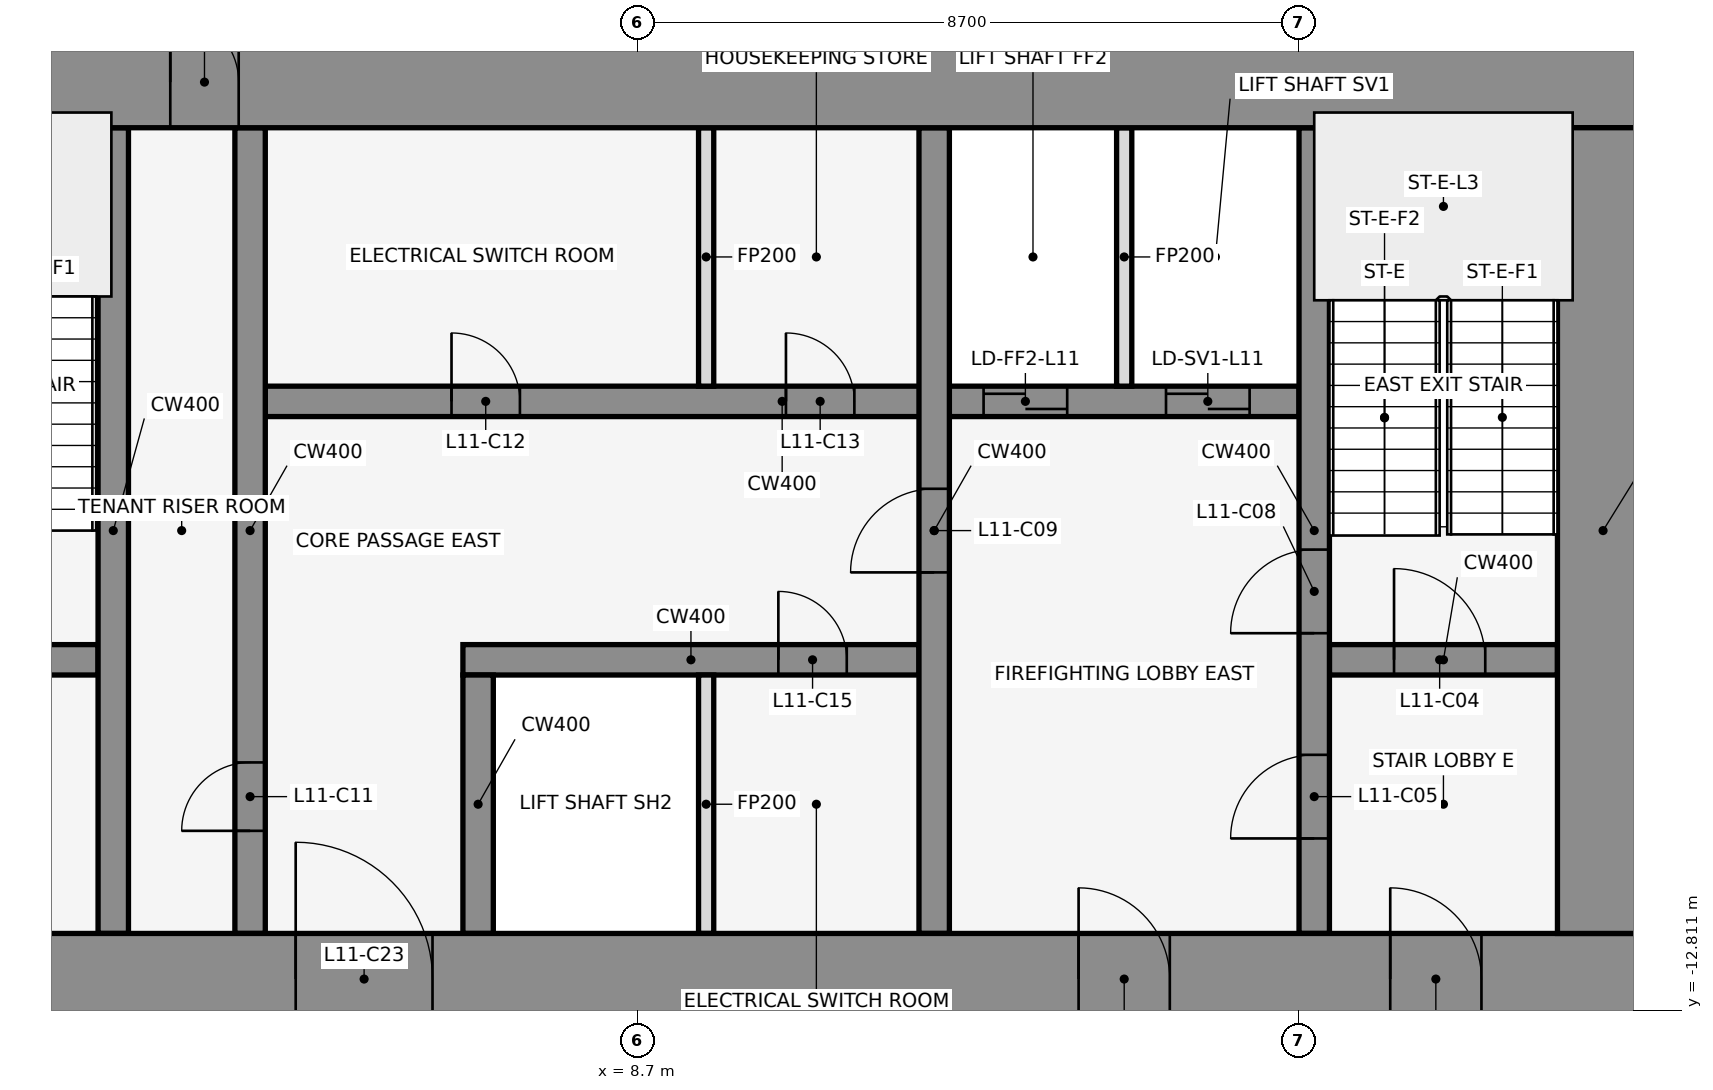
"""IFC4 building model, lengths in metres.
Left out: names, types, materials, properties, quantities, classifications, styles, units other than length and angle.
Written with IfcOpenShell. Run it as: python <this file> out.ifc"""

import sys

from ifc_helpers import new_model, si_unit, direction, frame, frame_2d, origin, place, context, subcontext, project, spatial, rectangle, extrude, element, fill, save


model = new_model("IFC4")
c1 = context("Model", 3, precision=1e-05, world=origin(), true_north=direction((0.0, 1.0)))
c2 = subcontext(c1, "Body", "Model", "MODEL_VIEW")
j1 = project(units=[si_unit("LENGTHUNIT", "METRE"), si_unit("PLANEANGLEUNIT", "RADIAN")], contexts=[c1])
p1 = place(None, origin())
s1 = spatial("IfcSite", under=j1, at=p1, CompositionType="ELEMENT")
p2 = place(p1, origin())
s2 = spatial("IfcBuilding", under=s1, at=p2, CompositionType="ELEMENT")
p3 = place(p2, frame((0.0, 0.0, 57.5)))
s3 = spatial("IfcBuildingStorey", under=s2, at=p3, CompositionType="ELEMENT", Elevation=57.5)
for number, where, z_axis, x_axis in (
    (1, (16.432, -0.105, 0.0), (0.0, 0.0, 1.0), (-0.84, 0.543, 0.0)),
    (2, (1.901, 1.08, 0.0), (0.0, 0.0, 1.0), (-0.84, -0.543, 0.0)),
):
    element("IfcWall", number, at=place(p3, frame(where, z_axis=z_axis, x_axis=x_axis)), inside=s3, PredefinedType="STANDARD", context=c2, shape_type="SweptSolid", body=[
        extrude(rectangle(XDim=2.183, YDim=0.25, at=frame_2d((1.091, 0.0))), origin(), (0.0, 0.0, 1.0), 4.35),
    ])
p4 = place(p3, frame((-1.6, -8.2, 0.0), z_axis=(0.0, 0.0, 1.0), x_axis=(1.0, 0.0, 0.0)))
e3 = element("IfcWall", 3, at=p4, inside=s3, PredefinedType="SHEAR", context=c2, shape_type="SweptSolid", body=[
    extrude(rectangle(XDim=3.2, YDim=0.4, at=frame_2d((1.6, 0.0))), origin(), (0.0, 0.0, 1.0), 4.5),
])
p5 = place(p4, frame((1.05, 0.0, 0.0)))
e4 = element("IfcOpeningElement", 4, at=p5, cuts=e3, PredefinedType="OPENING", context=c2, shape_type="SweptSolid", body=[
    extrude(rectangle(XDim=1.2, YDim=2.1, at=frame_2d((0.6, 1.05))), frame((0.0, 0.212, 0.0), z_axis=(0.0, -1.0, 0.0), x_axis=(1.0, 0.0, 0.0)), (0.0, 0.0, 1.0), 0.424),
])
p6 = place(p3, frame((6.4, -8.2, 0.0), z_axis=(0.0, 0.0, 1.0), x_axis=(1.0, 0.0, 0.0)))
e5 = element("IfcWall", 5, at=p6, inside=s3, PredefinedType="SHEAR", context=c2, shape_type="SweptSolid", body=[
    extrude(rectangle(XDim=6.0, YDim=0.4, at=frame_2d((3.0, 0.0))), origin(), (0.0, 0.0, 1.0), 4.5),
])
p7 = place(p6, frame((4.15, 0.0, 0.0)))
e6 = element("IfcOpeningElement", 6, at=p7, cuts=e5, PredefinedType="OPENING", context=c2, shape_type="SweptSolid", body=[
    extrude(rectangle(XDim=0.9, YDim=2.1, at=frame_2d((0.45, 1.05))), frame((0.0, 0.212, 0.0), z_axis=(0.0, -1.0, 0.0), x_axis=(1.0, 0.0, 0.0)), (0.0, 0.0, 1.0), 0.424),
])
p8 = place(p3, frame((17.8, -8.2, 0.0), z_axis=(0.0, 0.0, 1.0), x_axis=(1.0, 0.0, 0.0)))
e7 = element("IfcWall", 7, at=p8, inside=s3, PredefinedType="SHEAR", context=c2, shape_type="SweptSolid", body=[
    extrude(rectangle(XDim=3.0, YDim=0.4, at=frame_2d((1.5, 0.0))), origin(), (0.0, 0.0, 1.0), 4.5),
])
p9 = place(p8, frame((0.85, 0.0, 0.0)))
e8 = element("IfcOpeningElement", 8, at=p9, cuts=e7, PredefinedType="OPENING", context=c2, shape_type="SweptSolid", body=[
    extrude(rectangle(XDim=1.2, YDim=2.1, at=frame_2d((0.6, 1.05))), frame((0.0, 0.212, 0.0), z_axis=(0.0, -1.0, 0.0), x_axis=(1.0, 0.0, 0.0)), (0.0, 0.0, 1.0), 0.424),
])
p10 = place(p3, frame((3.8, -4.8, 0.0), z_axis=(0.0, 0.0, 1.0), x_axis=(1.0, 0.0, 0.0)))
e9 = element("IfcWall", 9, at=p10, inside=s3, PredefinedType="SHEAR", context=c2, shape_type="SweptSolid", body=[
    extrude(rectangle(XDim=13.6, YDim=0.4, at=frame_2d((6.8, 0.0))), origin(), (0.0, 0.0, 1.0), 4.5),
])
p11 = place(p10, frame((9.45, 0.0, 0.0)))
e10 = element("IfcOpeningElement", 10, at=p11, cuts=e9, PredefinedType="OPENING", context=c2, shape_type="SweptSolid", body=[
    extrude(rectangle(XDim=1.1, YDim=2.1, at=frame_2d((0.55, 1.05))), frame((0.0, 0.212, 0.0), z_axis=(0.0, -1.0, 0.0), x_axis=(1.0, 0.0, 0.0)), (0.0, 0.0, 1.0), 0.424),
])
p12 = place(p10, frame((11.85, 0.0, 0.0)))
e11 = element("IfcOpeningElement", 11, at=p12, cuts=e9, PredefinedType="OPENING", context=c2, shape_type="SweptSolid", body=[
    extrude(rectangle(XDim=1.1, YDim=2.1, at=frame_2d((0.55, 1.05))), frame((0.0, 0.212, 0.0), z_axis=(0.0, -1.0, 0.0), x_axis=(1.0, 0.0, 0.0)), (0.0, 0.0, 1.0), 0.424),
])
p13 = place(p10, frame((2.45, 0.0, 0.0)))
e12 = element("IfcOpeningElement", 12, at=p13, cuts=e9, PredefinedType="OPENING", context=c2, shape_type="SweptSolid", body=[
    extrude(rectangle(XDim=0.9, YDim=2.1, at=frame_2d((0.45, 1.05))), frame((0.0, 0.212, 0.0), z_axis=(0.0, -1.0, 0.0), x_axis=(1.0, 0.0, 0.0)), (0.0, 0.0, 1.0), 0.424),
])
p14 = place(p10, frame((6.85, 0.0, 0.0)))
e13 = element("IfcOpeningElement", 13, at=p14, cuts=e9, PredefinedType="OPENING", context=c2, shape_type="SweptSolid", body=[
    extrude(rectangle(XDim=0.9, YDim=2.1, at=frame_2d((0.45, 1.05))), frame((0.0, 0.212, 0.0), z_axis=(0.0, -1.0, 0.0), x_axis=(1.0, 0.0, 0.0)), (0.0, 0.0, 1.0), 0.424),
])
p15 = place(p3, frame((1.8, -11.8, 0.0), z_axis=(0.0, 0.0, 1.0), x_axis=(0.0, 1.0, 0.0)))
e14 = element("IfcWall", 14, at=p15, inside=s3, PredefinedType="SHEAR", context=c2, shape_type="SweptSolid", body=[
    extrude(rectangle(XDim=10.6, YDim=0.4, at=frame_2d((5.3, 0.0))), origin(), (0.0, 0.0, 1.0), 4.5),
])
p16 = place(p3, frame((3.6, -11.8, 0.0), z_axis=(0.0, 0.0, 1.0), x_axis=(0.0, 1.0, 0.0)))
e15 = element("IfcWall", 15, at=p16, inside=s3, PredefinedType="SHEAR", context=c2, shape_type="SweptSolid", body=[
    extrude(rectangle(XDim=10.6, YDim=0.4, at=frame_2d((5.3, 0.0))), origin(), (0.0, 0.0, 1.0), 4.5),
])
p17 = place(p16, frame((1.35, 0.0, 0.0)))
e16 = element("IfcOpeningElement", 16, at=p17, cuts=e15, PredefinedType="OPENING", context=c2, shape_type="SweptSolid", body=[
    extrude(rectangle(XDim=0.9, YDim=2.1, at=frame_2d((0.45, 1.05))), frame((0.0, 0.212, 0.0), z_axis=(0.0, -1.0, 0.0), x_axis=(1.0, 0.0, 0.0)), (0.0, 0.0, 1.0), 0.424),
])
p18 = place(p3, frame((6.6, -11.8, 0.0), z_axis=(0.0, 0.0, 1.0), x_axis=(0.0, 1.0, 0.0)))
e17 = element("IfcWall", 17, at=p18, inside=s3, PredefinedType="SHEAR", context=c2, shape_type="SweptSolid", body=[
    extrude(rectangle(XDim=3.4, YDim=0.4, at=frame_2d((1.7, 0.0))), origin(), (0.0, 0.0, 1.0), 4.5),
])
for number, where, z_axis, x_axis in (
    (18, (9.6, -11.8, 0.0), (0.0, 0.0, 1.0), (0.0, 1.0, 0.0)),
    (19, (9.6, -4.6, 0.0), (0.0, 0.0, 1.0), (0.0, 1.0, 0.0)),
):
    element("IfcWall", number, at=place(p3, frame(where, z_axis=z_axis, x_axis=x_axis)), inside=s3, PredefinedType="PARTITIONING", context=c2, shape_type="SweptSolid", body=[
        extrude(rectangle(XDim=3.4, YDim=0.2, at=frame_2d((1.7, 0.0))), origin(), (0.0, 0.0, 1.0), 3.418),
    ])
p19 = place(p3, frame((12.6, -11.8, 0.0), z_axis=(0.0, 0.0, 1.0), x_axis=(0.0, 1.0, 0.0)))
e20 = element("IfcWall", 20, at=p19, inside=s3, PredefinedType="SHEAR", context=c2, shape_type="SweptSolid", body=[
    extrude(rectangle(XDim=10.6, YDim=0.4, at=frame_2d((5.3, 0.0))), origin(), (0.0, 0.0, 1.0), 4.5),
])
p20 = place(p19, frame((4.75, 0.0, 0.0)))
e21 = element("IfcOpeningElement", 21, at=p20, cuts=e20, PredefinedType="OPENING", context=c2, shape_type="SweptSolid", body=[
    extrude(rectangle(XDim=1.1, YDim=2.1, at=frame_2d((0.55, 1.05))), frame((0.0, 0.212, 0.0), z_axis=(0.0, -1.0, 0.0), x_axis=(1.0, 0.0, 0.0)), (0.0, 0.0, 1.0), 0.424),
])
p21 = place(p3, frame((15.1, -4.6, 0.0), z_axis=(0.0, 0.0, 1.0), x_axis=(0.0, 1.0, 0.0)))
e22 = element("IfcWall", 22, at=p21, inside=s3, PredefinedType="PARTITIONING", context=c2, shape_type="SweptSolid", body=[
    extrude(rectangle(XDim=3.4, YDim=0.2, at=frame_2d((1.7, 0.0))), origin(), (0.0, 0.0, 1.0), 3.418),
])
p22 = place(p3, frame((17.6, -11.8, 0.0), z_axis=(0.0, 0.0, 1.0), x_axis=(0.0, 1.0, 0.0)))
e23 = element("IfcWall", 23, at=p22, inside=s3, PredefinedType="SHEAR", context=c2, shape_type="SweptSolid", body=[
    extrude(rectangle(XDim=10.6, YDim=0.4, at=frame_2d((5.3, 0.0))), origin(), (0.0, 0.0, 1.0), 4.5),
])
p23 = place(p22, frame((1.25, 0.0, 0.0)))
e24 = element("IfcOpeningElement", 24, at=p23, cuts=e23, PredefinedType="OPENING", context=c2, shape_type="SweptSolid", body=[
    extrude(rectangle(XDim=1.1, YDim=2.1, at=frame_2d((0.55, 1.05))), frame((0.0, 0.212, 0.0), z_axis=(0.0, -1.0, 0.0), x_axis=(1.0, 0.0, 0.0)), (0.0, 0.0, 1.0), 0.424),
])
p24 = place(p22, frame((3.95, 0.0, 0.0)))
e25 = element("IfcOpeningElement", 25, at=p24, cuts=e23, PredefinedType="OPENING", context=c2, shape_type="SweptSolid", body=[
    extrude(rectangle(XDim=1.1, YDim=2.1, at=frame_2d((0.55, 1.05))), frame((0.0, 0.212, 0.0), z_axis=(0.0, -1.0, 0.0), x_axis=(1.0, 0.0, 0.0)), (0.0, 0.0, 1.0), 0.424),
])
p25 = place(p3, frame((-22.0, -0.6, 0.0), z_axis=(0.0, 0.0, 1.0), x_axis=(1.0, 0.0, 0.0)))
e26 = element("IfcWall", 26, at=p25, inside=s3, PredefinedType="SHEAR", context=c2, shape_type="SweptSolid", body=[
    extrude(rectangle(XDim=44.0, YDim=1.2, at=frame_2d((22.0, 0.0))), origin(), (0.0, 0.0, 1.0), 4.5),
])
p26 = place(p25, frame((18.55, 0.0, 0.0)))
e27 = element("IfcOpeningElement", 27, at=p26, cuts=e26, PredefinedType="OPENING", context=c2, shape_type="SweptSolid", body=[
    extrude(rectangle(XDim=0.9, YDim=2.1, at=frame_2d((0.45, 1.05))), frame((0.0, 0.612, 0.0), z_axis=(0.0, -1.0, 0.0), x_axis=(1.0, 0.0, 0.0)), (0.0, 0.0, 1.0), 1.224),
])
p27 = place(p25, frame((24.55, 0.0, 0.0)))
e28 = element("IfcOpeningElement", 28, at=p27, cuts=e26, PredefinedType="OPENING", context=c2, shape_type="SweptSolid", body=[
    extrude(rectangle(XDim=0.9, YDim=2.1, at=frame_2d((0.45, 1.05))), frame((0.0, 0.612, 0.0), z_axis=(0.0, -1.0, 0.0), x_axis=(1.0, 0.0, 0.0)), (0.0, 0.0, 1.0), 1.224),
])
p28 = place(p3, frame((-22.0, -12.4, 0.0), z_axis=(0.0, 0.0, 1.0), x_axis=(1.0, 0.0, 0.0)))
e29 = element("IfcWall", 29, at=p28, inside=s3, PredefinedType="SHEAR", context=c2, shape_type="SweptSolid", body=[
    extrude(rectangle(XDim=44.0, YDim=1.2, at=frame_2d((22.0, 0.0))), origin(), (0.0, 0.0, 1.0), 4.5),
])
p29 = place(p28, frame((2.2, 0.0, 0.0)))
e30 = element("IfcOpeningElement", 30, at=p29, cuts=e29, PredefinedType="OPENING", context=c2, shape_type="SweptSolid", body=[
    extrude(rectangle(XDim=1.2, YDim=2.1, at=frame_2d((0.6, 1.05))), frame((0.0, 0.612, 0.0), z_axis=(0.0, -1.0, 0.0), x_axis=(1.0, 0.0, 0.0)), (0.0, 0.0, 1.0), 1.224),
])
p30 = place(p28, frame((21.4, 0.0, 0.0)))
e31 = element("IfcOpeningElement", 31, at=p30, cuts=e29, PredefinedType="OPENING", context=c2, shape_type="SweptSolid", body=[
    extrude(rectangle(XDim=1.2, YDim=2.1, at=frame_2d((0.6, 1.05))), frame((0.0, 0.612, 0.0), z_axis=(0.0, -1.0, 0.0), x_axis=(1.0, 0.0, 0.0)), (0.0, 0.0, 1.0), 1.224),
])
p31 = place(p28, frame((40.6, 0.0, 0.0)))
e32 = element("IfcOpeningElement", 32, at=p31, cuts=e29, PredefinedType="OPENING", context=c2, shape_type="SweptSolid", body=[
    extrude(rectangle(XDim=1.2, YDim=2.1, at=frame_2d((0.6, 1.05))), frame((0.0, 0.612, 0.0), z_axis=(0.0, -1.0, 0.0), x_axis=(1.0, 0.0, 0.0)), (0.0, 0.0, 1.0), 1.224),
])
p32 = place(p28, frame((16.0, 0.0, 0.0)))
e33 = element("IfcOpeningElement", 33, at=p32, cuts=e29, PredefinedType="OPENING", context=c2, shape_type="SweptSolid", body=[
    extrude(rectangle(XDim=1.8, YDim=2.1, at=frame_2d((0.9, 1.05))), frame((0.0, 0.612, 0.0), z_axis=(0.0, -1.0, 0.0), x_axis=(1.0, 0.0, 0.0)), (0.0, 0.0, 1.0), 1.224),
])
p33 = place(p28, frame((6.3, 0.0, 0.0)))
e34 = element("IfcOpeningElement", 34, at=p33, cuts=e29, PredefinedType="OPENING", context=c2, shape_type="SweptSolid", body=[
    extrude(rectangle(XDim=1.2, YDim=2.1, at=frame_2d((0.6, 1.05))), frame((0.0, 0.612, 0.0), z_axis=(0.0, -1.0, 0.0), x_axis=(1.0, 0.0, 0.0)), (0.0, 0.0, 1.0), 1.224),
])
p34 = place(p28, frame((26.2, 0.0, 0.0)))
e35 = element("IfcOpeningElement", 35, at=p34, cuts=e29, PredefinedType="OPENING", context=c2, shape_type="SweptSolid", body=[
    extrude(rectangle(XDim=1.8, YDim=2.1, at=frame_2d((0.9, 1.05))), frame((0.0, 0.612, 0.0), z_axis=(0.0, -1.0, 0.0), x_axis=(1.0, 0.0, 0.0)), (0.0, 0.0, 1.0), 1.224),
])
p35 = place(p28, frame((36.5, 0.0, 0.0)))
e36 = element("IfcOpeningElement", 36, at=p35, cuts=e29, PredefinedType="OPENING", context=c2, shape_type="SweptSolid", body=[
    extrude(rectangle(XDim=1.2, YDim=2.1, at=frame_2d((0.6, 1.05))), frame((0.0, 0.612, 0.0), z_axis=(0.0, -1.0, 0.0), x_axis=(1.0, 0.0, 0.0)), (0.0, 0.0, 1.0), 1.224),
])
p36 = place(p3, frame((21.4, -11.8, 0.0), z_axis=(0.0, 0.0, 1.0), x_axis=(0.0, 1.0, 0.0)))
e37 = element("IfcWall", 37, at=p36, inside=s3, PredefinedType="SHEAR", context=c2, shape_type="SweptSolid", body=[
    extrude(rectangle(XDim=10.6, YDim=1.2, at=frame_2d((5.3, 0.0))), origin(), (0.0, 0.0, 1.0), 4.5),
])
p37 = place(p9, origin())
e38 = element("IfcDoor", 38, at=p37, inside=s3, OperationType="SINGLE_SWING_RIGHT", PredefinedType="DOOR", context=c2, shape_type="SweptSolid", body=[
    extrude(rectangle(XDim=1.2, YDim=2.1, at=frame_2d((0.6, 1.05))), frame((0.0, 0.025, 0.0), z_axis=(0.0, -1.0, 0.0), x_axis=(1.0, 0.0, 0.0)), (0.0, 0.0, 1.0), 0.05),
])
fill(e8, e38)
p38 = place(p23, origin())
e39 = element("IfcDoor", 39, at=p38, inside=s3, OperationType="SINGLE_SWING_LEFT", PredefinedType="DOOR", context=c2, shape_type="SweptSolid", body=[
    extrude(rectangle(XDim=1.1, YDim=2.1, at=frame_2d((0.55, 1.05))), frame((0.0, 0.025, 0.0), z_axis=(0.0, -1.0, 0.0), x_axis=(1.0, 0.0, 0.0)), (0.0, 0.0, 1.0), 0.05),
])
fill(e24, e39)
p39 = place(p11, origin())
e40 = element("IfcDoor", 40, at=p39, inside=s3, OperationType="DOUBLE_DOOR_SLIDING", PredefinedType="DOOR", context=c2, shape_type="SweptSolid", body=[
    extrude(rectangle(XDim=1.1, YDim=2.1, at=frame_2d((0.55, 1.05))), frame((0.0, 0.025, 0.0), z_axis=(0.0, -1.0, 0.0), x_axis=(1.0, 0.0, 0.0)), (0.0, 0.0, 1.0), 0.05),
])
fill(e10, e40)
p40 = place(p12, origin())
e41 = element("IfcDoor", 41, at=p40, inside=s3, OperationType="DOUBLE_DOOR_SLIDING", PredefinedType="DOOR", context=c2, shape_type="SweptSolid", body=[
    extrude(rectangle(XDim=1.1, YDim=2.1, at=frame_2d((0.55, 1.05))), frame((0.0, 0.025, 0.0), z_axis=(0.0, -1.0, 0.0), x_axis=(1.0, 0.0, 0.0)), (0.0, 0.0, 1.0), 0.05),
])
fill(e11, e41)
p41 = place(p24, origin())
e42 = element("IfcDoor", 42, at=p41, inside=s3, OperationType="SINGLE_SWING_RIGHT", PredefinedType="DOOR", context=c2, shape_type="SweptSolid", body=[
    extrude(rectangle(XDim=1.1, YDim=2.1, at=frame_2d((0.55, 1.05))), frame((0.0, 0.025, 0.0), z_axis=(0.0, -1.0, 0.0), x_axis=(1.0, 0.0, 0.0)), (0.0, 0.0, 1.0), 0.05),
])
fill(e25, e42)
p42 = place(p20, frame((1.1, 0.0, 0.0), z_axis=(0.0, 0.0, 1.0), x_axis=(-1.0, 0.0, 0.0)))
e43 = element("IfcDoor", 43, at=p42, inside=s3, OperationType="SINGLE_SWING_RIGHT", PredefinedType="DOOR", context=c2, shape_type="SweptSolid", body=[
    extrude(rectangle(XDim=1.1, YDim=2.1, at=frame_2d((0.55, 1.05))), frame((0.0, 0.025, 0.0), z_axis=(0.0, -1.0, 0.0), x_axis=(1.0, 0.0, 0.0)), (0.0, 0.0, 1.0), 0.05),
])
fill(e21, e43)
p43 = place(p17, origin())
e44 = element("IfcDoor", 44, at=p43, inside=s3, OperationType="SINGLE_SWING_LEFT", PredefinedType="DOOR", context=c2, shape_type="SweptSolid", body=[
    extrude(rectangle(XDim=0.9, YDim=2.1, at=frame_2d((0.45, 1.05))), frame((0.0, 0.025, 0.0), z_axis=(0.0, -1.0, 0.0), x_axis=(1.0, 0.0, 0.0)), (0.0, 0.0, 1.0), 0.05),
])
fill(e16, e44)
p44 = place(p13, origin())
e45 = element("IfcDoor", 45, at=p44, inside=s3, OperationType="SINGLE_SWING_RIGHT", PredefinedType="DOOR", context=c2, shape_type="SweptSolid", body=[
    extrude(rectangle(XDim=0.9, YDim=2.1, at=frame_2d((0.45, 1.05))), frame((0.0, 0.025, 0.0), z_axis=(0.0, -1.0, 0.0), x_axis=(1.0, 0.0, 0.0)), (0.0, 0.0, 1.0), 0.05),
])
fill(e12, e45)
p45 = place(p14, origin())
e46 = element("IfcDoor", 46, at=p45, inside=s3, OperationType="SINGLE_SWING_LEFT", PredefinedType="DOOR", context=c2, shape_type="SweptSolid", body=[
    extrude(rectangle(XDim=0.9, YDim=2.1, at=frame_2d((0.45, 1.05))), frame((0.0, 0.025, 0.0), z_axis=(0.0, -1.0, 0.0), x_axis=(1.0, 0.0, 0.0)), (0.0, 0.0, 1.0), 0.05),
])
fill(e13, e46)
p46 = place(p7, frame((0.9, 0.0, 0.0), z_axis=(0.0, 0.0, 1.0), x_axis=(-1.0, 0.0, 0.0)))
e47 = element("IfcDoor", 47, at=p46, inside=s3, OperationType="SINGLE_SWING_RIGHT", PredefinedType="DOOR", context=c2, shape_type="SweptSolid", body=[
    extrude(rectangle(XDim=0.9, YDim=2.1, at=frame_2d((0.45, 1.05))), frame((0.0, 0.025, 0.0), z_axis=(0.0, -1.0, 0.0), x_axis=(1.0, 0.0, 0.0)), (0.0, 0.0, 1.0), 0.05),
])
fill(e6, e47)
p47 = place(p27, origin())
e48 = element("IfcDoor", 48, at=p47, inside=s3, OperationType="SINGLE_SWING_LEFT", PredefinedType="DOOR", context=c2, shape_type="SweptSolid", body=[
    extrude(rectangle(XDim=0.9, YDim=2.1, at=frame_2d((0.45, 1.05))), frame((0.0, 0.025, 0.0), z_axis=(0.0, -1.0, 0.0), x_axis=(1.0, 0.0, 0.0)), (0.0, 0.0, 1.0), 0.05),
])
fill(e28, e48)
p48 = place(p31, frame((1.2, 0.0, 0.0), z_axis=(0.0, 0.0, 1.0), x_axis=(-1.0, 0.0, 0.0)))
e49 = element("IfcDoor", 49, at=p48, inside=s3, OperationType="SINGLE_SWING_RIGHT", PredefinedType="DOOR", context=c2, shape_type="SweptSolid", body=[
    extrude(rectangle(XDim=1.2, YDim=2.1, at=frame_2d((0.6, 1.05))), frame((0.0, 0.025, 0.0), z_axis=(0.0, -1.0, 0.0), x_axis=(1.0, 0.0, 0.0)), (0.0, 0.0, 1.0), 0.05),
])
fill(e32, e49)
p49 = place(p34, origin())
e50 = element("IfcDoor", 50, at=p49, inside=s3, OperationType="SINGLE_SWING_LEFT", PredefinedType="DOOR", context=c2, shape_type="SweptSolid", body=[
    extrude(rectangle(XDim=1.8, YDim=2.1, at=frame_2d((0.9, 1.05))), frame((0.0, 0.025, 0.0), z_axis=(0.0, -1.0, 0.0), x_axis=(1.0, 0.0, 0.0)), (0.0, 0.0, 1.0), 0.05),
])
fill(e35, e50)
p50 = place(p35, frame((1.2, 0.0, 0.0), z_axis=(0.0, 0.0, 1.0), x_axis=(-1.0, 0.0, 0.0)))
e51 = element("IfcDoor", 51, at=p50, inside=s3, OperationType="SINGLE_SWING_RIGHT", PredefinedType="DOOR", context=c2, shape_type="SweptSolid", body=[
    extrude(rectangle(XDim=1.2, YDim=2.1, at=frame_2d((0.6, 1.05))), frame((0.0, 0.025, 0.0), z_axis=(0.0, -1.0, 0.0), x_axis=(1.0, 0.0, 0.0)), (0.0, 0.0, 1.0), 0.05),
])
fill(e36, e51)
save(model, sys.argv[1])
